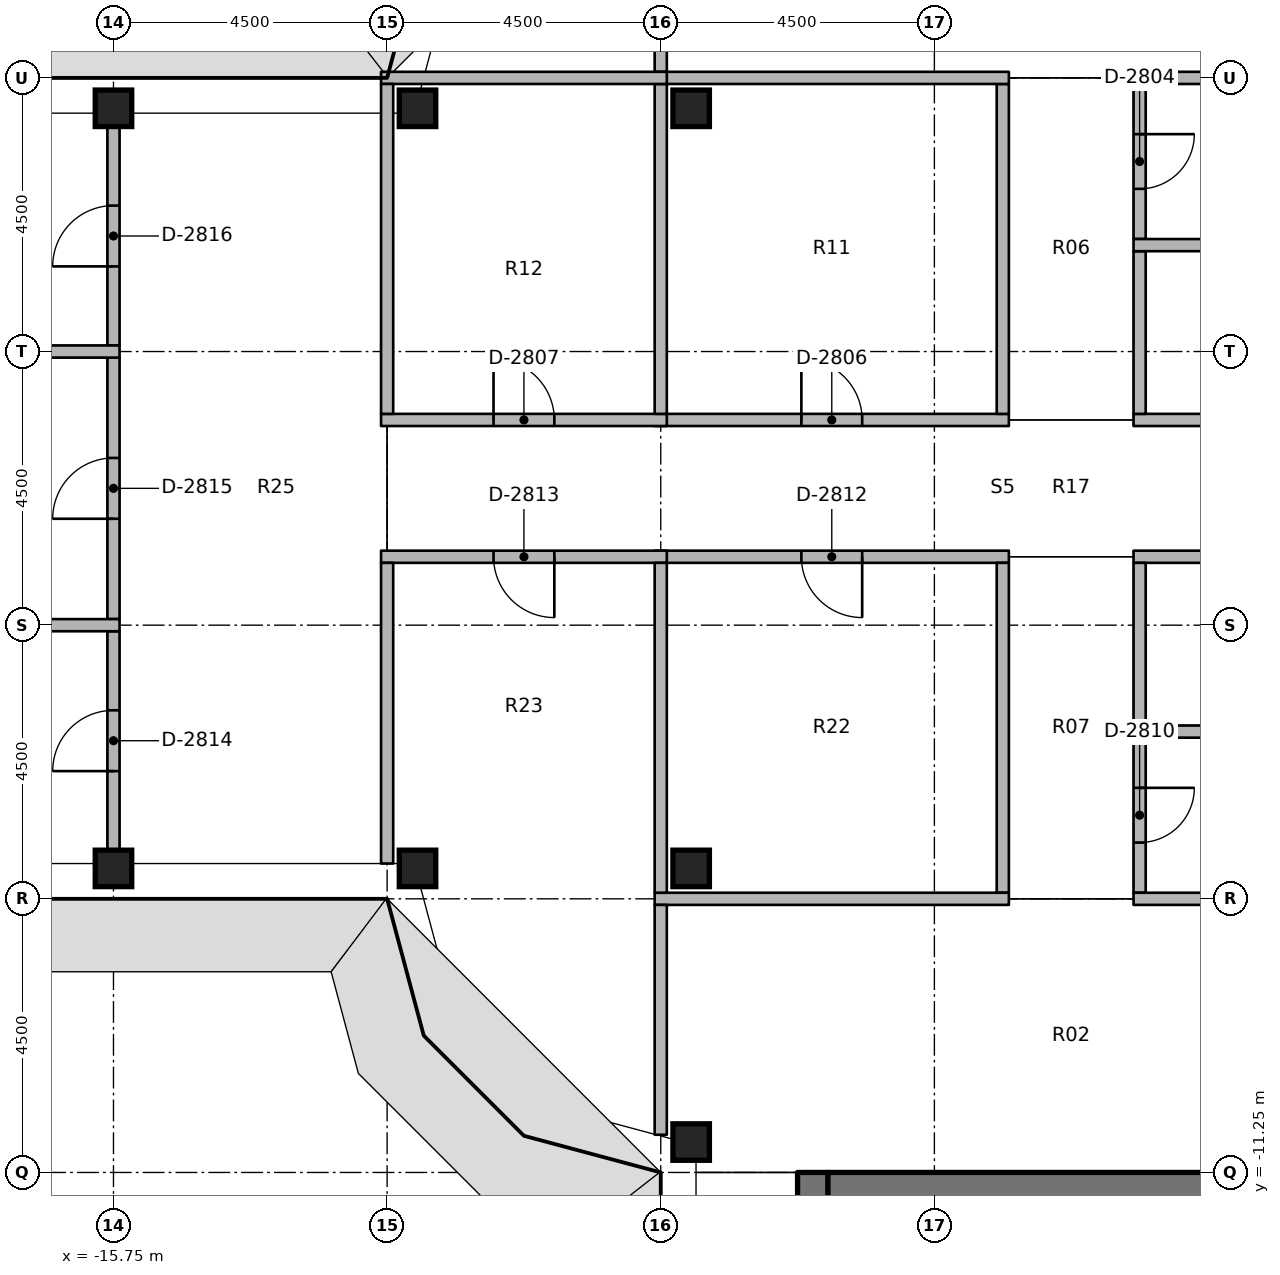
"""IFC4 building model, lengths in metres.
Left out: names, types, materials, properties, quantities, classifications, styles, units other than length and angle.
Written with IfcOpenShell. Run it as: python <this file> out.ifc"""

import sys

from ifc_helpers import new_model, si_unit, direction, frame, frame_2d, origin, origin_2d, place, context, subcontext, project, spatial, rectangle, extrude, element, fill, save


model = new_model("IFC4")
c1 = context("Model", 3, precision=1e-05, world=origin(), true_north=direction((0.0, 1.0)))
c2 = subcontext(c1, "Body", "Model", "MODEL_VIEW")
j1 = project(units=[si_unit("LENGTHUNIT", "METRE"), si_unit("PLANEANGLEUNIT", "RADIAN")], contexts=[c1])
p1 = place(None, origin())
s1 = spatial("IfcSite", under=j1, at=p1, CompositionType="ELEMENT")
p2 = place(p1, origin())
s2 = spatial("IfcBuilding", under=s1, at=p2, CompositionType="ELEMENT")
p3 = place(p2, frame((0.0, 0.0, 265.0)))
s3 = spatial("IfcBuildingStorey", under=s2, at=p3, CompositionType="ELEMENT", Elevation=265.0)
for number, where, z_axis, x_axis in (
    (1, (-15.75, -6.25, 0.0), (0.0, 0.0, 1.0), (1.0, 0.0, 0.0)),
    (2, (-15.75, 6.25, 0.0), (0.0, 0.0, 1.0), (1.0, 0.0, 0.0)),
    (3, (-10.75, -6.25, 0.0), (0.0, 0.0, 1.0), (1.0, 0.0, 0.0)),
    (4, (-10.75, 6.25, 0.0), (0.0, 0.0, 1.0), (1.0, 0.0, 0.0)),
    (5, (-6.25, -10.75, 0.0), (0.0, 0.0, 1.0), (1.0, 0.0, 0.0)),
    (6, (-6.25, -6.25, 0.0), (0.0, 0.0, 1.0), (1.0, 0.0, 0.0)),
    (7, (-6.25, 6.25, 0.0), (0.0, 0.0, 1.0), (1.0, 0.0, 0.0)),
):
    element("IfcColumn", number, at=place(p3, frame(where, z_axis=z_axis, x_axis=x_axis)), inside=s3, PredefinedType="COLUMN", context=c2, shape_type="SweptSolid", body=[
        extrude(rectangle(XDim=0.6, YDim=0.6, at=origin_2d()), origin(), (0.0, 0.0, 1.0), 3.65),
    ])
p4 = place(p3, frame((-4.25, -11.25, 0.0), z_axis=(0.0, 0.0, 1.0), x_axis=(0.0, -1.0, 0.0)))
e8 = element("IfcWall", 8, at=p4, inside=s3, PredefinedType="SHEAR", context=c2, shape_type="SweptSolid", body=[
    extrude(rectangle(XDim=15.0, YDim=0.5, at=frame_2d((7.5, 0.0))), origin(), (0.0, 0.0, 1.0), 3.8),
])
p5 = place(p4, frame((7.15, 0.0, 0.0)))
e9 = element("IfcOpeningElement", 9, at=p5, cuts=e8, PredefinedType="OPENING", context=c2, shape_type="SweptSolid", body=[
    extrude(rectangle(XDim=1.5, YDim=2.3, at=frame_2d((0.75, 1.15))), frame((0.0, 0.26, 0.0), z_axis=(0.0, -1.0, 0.0), x_axis=(1.0, 0.0, 0.0)), (0.0, 0.0, 1.0), 0.52),
])
p6 = place(p4, frame((5.55, 0.0, 0.0)))
e10 = element("IfcOpeningElement", 10, at=p6, cuts=e8, PredefinedType="OPENING", context=c2, shape_type="SweptSolid", body=[
    extrude(rectangle(XDim=1.2, YDim=2.1, at=frame_2d((0.6, 1.05))), frame((0.0, 0.26, 0.0), z_axis=(0.0, -1.0, 0.0), x_axis=(1.0, 0.0, 0.0)), (0.0, 0.0, 1.0), 0.52),
])
p7 = place(p3, frame((-4.0, -11.5, 0.0), z_axis=(0.0, 0.0, 1.0), x_axis=(1.0, 0.0, 0.0)))
e11 = element("IfcWall", 11, at=p7, inside=s3, PredefinedType="SHEAR", context=c2, shape_type="SweptSolid", body=[
    extrude(rectangle(XDim=8.0, YDim=0.5, at=frame_2d((4.0, 0.0))), origin(), (0.0, 0.0, 1.0), 3.8),
])
p8 = place(p3, frame((1.025, 1.125, 0.0), z_axis=(0.0, 0.0, 1.0), x_axis=(1.0, 0.0, 0.0)))
e12 = element("IfcWall", 12, at=p8, inside=s3, PredefinedType="PARTITIONING", context=c2, shape_type="SweptSolid", body=[
    extrude(rectangle(XDim=5.825, YDim=0.2, at=frame_2d((2.913, 0.0))), origin(), (0.0, 0.0, 1.0), 2.75),
])
p9 = place(p8, frame((2.462, 0.0, 0.0)))
e13 = element("IfcOpeningElement", 13, at=p9, cuts=e12, PredefinedType="OPENING", context=c2, shape_type="SweptSolid", body=[
    extrude(rectangle(XDim=0.9, YDim=2.1, at=frame_2d((0.45, 1.05))), frame((0.0, 0.11, 0.0), z_axis=(0.0, -1.0, 0.0), x_axis=(1.0, 0.0, 0.0)), (0.0, 0.0, 1.0), 0.22),
])
p10 = place(p3, frame((-6.85, 1.125, 0.0), z_axis=(0.0, 0.0, 1.0), x_axis=(1.0, 0.0, 0.0)))
e14 = element("IfcWall", 14, at=p10, inside=s3, PredefinedType="PARTITIONING", context=c2, shape_type="SweptSolid", body=[
    extrude(rectangle(XDim=5.825, YDim=0.2, at=frame_2d((2.913, 0.0))), origin(), (0.0, 0.0, 1.0), 2.75),
])
p11 = place(p10, frame((2.413, 0.0, 0.0)))
e15 = element("IfcOpeningElement", 15, at=p11, cuts=e14, PredefinedType="OPENING", context=c2, shape_type="SweptSolid", body=[
    extrude(rectangle(XDim=1.0, YDim=2.1, at=frame_2d((0.5, 1.05))), frame((0.0, 0.11, 0.0), z_axis=(0.0, -1.0, 0.0), x_axis=(1.0, 0.0, 0.0)), (0.0, 0.0, 1.0), 0.22),
])
p12 = place(p3, frame((-11.35, 1.125, 0.0), z_axis=(0.0, 0.0, 1.0), x_axis=(1.0, 0.0, 0.0)))
e16 = element("IfcWall", 16, at=p12, inside=s3, PredefinedType="PARTITIONING", context=c2, shape_type="SweptSolid", body=[
    extrude(rectangle(XDim=4.7, YDim=0.2, at=frame_2d((2.35, 0.0))), origin(), (0.0, 0.0, 1.0), 2.75),
])
p13 = place(p12, frame((1.85, 0.0, 0.0)))
e17 = element("IfcOpeningElement", 17, at=p13, cuts=e16, PredefinedType="OPENING", context=c2, shape_type="SweptSolid", body=[
    extrude(rectangle(XDim=1.0, YDim=2.1, at=frame_2d((0.5, 1.05))), frame((0.0, 0.11, 0.0), z_axis=(0.0, -1.0, 0.0), x_axis=(1.0, 0.0, 0.0)), (0.0, 0.0, 1.0), 0.22),
])
p14 = place(p3, frame((6.85, -1.125, 0.0), z_axis=(0.0, 0.0, 1.0), x_axis=(-1.0, 0.0, 0.0)))
e18 = element("IfcWall", 18, at=p14, inside=s3, PredefinedType="PARTITIONING", context=c2, shape_type="SweptSolid", body=[
    extrude(rectangle(XDim=5.825, YDim=0.2, at=frame_2d((2.913, 0.0))), origin(), (0.0, 0.0, 1.0), 2.75),
])
p15 = place(p14, frame((2.462, 0.0, 0.0)))
e19 = element("IfcOpeningElement", 19, at=p15, cuts=e18, PredefinedType="OPENING", context=c2, shape_type="SweptSolid", body=[
    extrude(rectangle(XDim=0.9, YDim=2.1, at=frame_2d((0.45, 1.05))), frame((0.0, 0.11, 0.0), z_axis=(0.0, -1.0, 0.0), x_axis=(1.0, 0.0, 0.0)), (0.0, 0.0, 1.0), 0.22),
])
p16 = place(p3, frame((-1.025, -1.125, 0.0), z_axis=(0.0, 0.0, 1.0), x_axis=(-1.0, 0.0, 0.0)))
e20 = element("IfcWall", 20, at=p16, inside=s3, PredefinedType="PARTITIONING", context=c2, shape_type="SweptSolid", body=[
    extrude(rectangle(XDim=5.825, YDim=0.2, at=frame_2d((2.913, 0.0))), origin(), (0.0, 0.0, 1.0), 2.75),
])
p17 = place(p16, frame((2.413, 0.0, 0.0)))
e21 = element("IfcOpeningElement", 21, at=p17, cuts=e20, PredefinedType="OPENING", context=c2, shape_type="SweptSolid", body=[
    extrude(rectangle(XDim=1.0, YDim=2.1, at=frame_2d((0.5, 1.05))), frame((0.0, 0.11, 0.0), z_axis=(0.0, -1.0, 0.0), x_axis=(1.0, 0.0, 0.0)), (0.0, 0.0, 1.0), 0.22),
])
p18 = place(p3, frame((-6.65, -1.125, 0.0), z_axis=(0.0, 0.0, 1.0), x_axis=(-1.0, 0.0, 0.0)))
e22 = element("IfcWall", 22, at=p18, inside=s3, PredefinedType="PARTITIONING", context=c2, shape_type="SweptSolid", body=[
    extrude(rectangle(XDim=4.7, YDim=0.2, at=frame_2d((2.35, 0.0))), origin(), (0.0, 0.0, 1.0), 2.75),
])
p19 = place(p18, frame((1.85, 0.0, 0.0)))
e23 = element("IfcOpeningElement", 23, at=p19, cuts=e22, PredefinedType="OPENING", context=c2, shape_type="SweptSolid", body=[
    extrude(rectangle(XDim=1.0, YDim=2.1, at=frame_2d((0.5, 1.05))), frame((0.0, 0.11, 0.0), z_axis=(0.0, -1.0, 0.0), x_axis=(1.0, 0.0, 0.0)), (0.0, 0.0, 1.0), 0.22),
])
p20 = place(p3, frame((1.125, 1.225, 0.0), z_axis=(0.0, 0.0, 1.0), x_axis=(0.0, 1.0, 0.0)))
e24 = element("IfcWall", 24, at=p20, inside=s3, PredefinedType="PARTITIONING", context=c2, shape_type="SweptSolid", body=[
    extrude(rectangle(XDim=2.675, YDim=0.2, at=frame_2d((1.337, 0.0))), origin(), (0.0, 0.0, 1.0), 2.75),
])
p21 = place(p3, frame((1.125, 6.65, 0.0), z_axis=(0.0, 0.0, 1.0), x_axis=(0.0, -1.0, 0.0)))
e25 = element("IfcWall", 25, at=p21, inside=s3, PredefinedType="PARTITIONING", context=c2, shape_type="SweptSolid", body=[
    extrude(rectangle(XDim=2.55, YDim=0.2, at=frame_2d((1.275, 0.0))), origin(), (0.0, 0.0, 1.0), 2.75),
])
p22 = place(p21, frame((0.825, 0.0, 0.0)))
e26 = element("IfcOpeningElement", 26, at=p22, cuts=e25, PredefinedType="OPENING", context=c2, shape_type="SweptSolid", body=[
    extrude(rectangle(XDim=0.9, YDim=2.1, at=frame_2d((0.45, 1.05))), frame((0.0, 0.11, 0.0), z_axis=(0.0, -1.0, 0.0), x_axis=(1.0, 0.0, 0.0)), (0.0, 0.0, 1.0), 0.22),
])
p23 = place(p3, frame((-1.125, 1.225, 0.0), z_axis=(0.0, 0.0, 1.0), x_axis=(0.0, 1.0, 0.0)))
e27 = element("IfcWall", 27, at=p23, inside=s3, PredefinedType="PARTITIONING", context=c2, shape_type="SweptSolid", body=[
    extrude(rectangle(XDim=5.425, YDim=0.2, at=frame_2d((2.712, 0.0))), origin(), (0.0, 0.0, 1.0), 2.75),
])
p24 = place(p3, frame((1.125, -3.9, 0.0), z_axis=(0.0, 0.0, 1.0), x_axis=(0.0, 1.0, 0.0)))
e28 = element("IfcWall", 28, at=p24, inside=s3, PredefinedType="PARTITIONING", context=c2, shape_type="SweptSolid", body=[
    extrude(rectangle(XDim=2.675, YDim=0.2, at=frame_2d((1.337, 0.0))), origin(), (0.0, 0.0, 1.0), 2.75),
])
p25 = place(p3, frame((1.125, -4.1, 0.0), z_axis=(0.0, 0.0, 1.0), x_axis=(0.0, -1.0, 0.0)))
e29 = element("IfcWall", 29, at=p25, inside=s3, PredefinedType="PARTITIONING", context=c2, shape_type="SweptSolid", body=[
    extrude(rectangle(XDim=2.55, YDim=0.2, at=frame_2d((1.275, 0.0))), origin(), (0.0, 0.0, 1.0), 2.75),
])
p26 = place(p25, frame((0.825, 0.0, 0.0)))
e30 = element("IfcOpeningElement", 30, at=p26, cuts=e29, PredefinedType="OPENING", context=c2, shape_type="SweptSolid", body=[
    extrude(rectangle(XDim=0.9, YDim=2.1, at=frame_2d((0.45, 1.05))), frame((0.0, 0.11, 0.0), z_axis=(0.0, -1.0, 0.0), x_axis=(1.0, 0.0, 0.0)), (0.0, 0.0, 1.0), 0.22),
])
p27 = place(p3, frame((-1.125, -6.65, 0.0), z_axis=(0.0, 0.0, 1.0), x_axis=(0.0, 1.0, 0.0)))
e31 = element("IfcWall", 31, at=p27, inside=s3, PredefinedType="PARTITIONING", context=c2, shape_type="SweptSolid", body=[
    extrude(rectangle(XDim=5.425, YDim=0.2, at=frame_2d((2.712, 0.0))), origin(), (0.0, 0.0, 1.0), 2.75),
])
for number, where, z_axis, x_axis in (
    (32, (1.025, 6.75, 0.0), (0.0, 0.0, 1.0), (1.0, 0.0, 0.0)),
    (33, (-6.85, 6.75, 0.0), (0.0, 0.0, 1.0), (1.0, 0.0, 0.0)),
):
    element("IfcWall", number, at=place(p3, frame(where, z_axis=z_axis, x_axis=x_axis)), inside=s3, PredefinedType="PARTITIONING", context=c2, shape_type="SweptSolid", body=[
        extrude(rectangle(XDim=5.825, YDim=0.2, at=frame_2d((2.913, 0.0))), origin(), (0.0, 0.0, 1.0), 2.75),
    ])
p28 = place(p3, frame((-6.75, 6.85, 0.0), z_axis=(0.0, 0.0, 1.0), x_axis=(0.0, 1.0, 0.0)))
e34 = element("IfcWall", 34, at=p28, inside=s3, PredefinedType="PARTITIONING", context=c2, shape_type="SweptSolid", body=[
    extrude(rectangle(XDim=3.78, YDim=0.2, at=frame_2d((1.89, 0.0))), origin(), (0.0, 0.0, 1.0), 2.75),
])
p29 = place(p28, frame((1.44, 0.0, 0.0)))
e35 = element("IfcOpeningElement", 35, at=p29, cuts=e34, PredefinedType="OPENING", context=c2, shape_type="SweptSolid", body=[
    extrude(rectangle(XDim=0.9, YDim=2.1, at=frame_2d((0.45, 1.05))), frame((0.0, 0.11, 0.0), z_axis=(0.0, -1.0, 0.0), x_axis=(1.0, 0.0, 0.0)), (0.0, 0.0, 1.0), 0.22),
])
for number, where, z_axis, x_axis in (
    (36, (1.025, -6.75, 0.0), (0.0, 0.0, 1.0), (1.0, 0.0, 0.0)),
    (37, (-6.85, -6.75, 0.0), (0.0, 0.0, 1.0), (1.0, 0.0, 0.0)),
):
    element("IfcWall", number, at=place(p3, frame(where, z_axis=z_axis, x_axis=x_axis)), inside=s3, PredefinedType="PARTITIONING", context=c2, shape_type="SweptSolid", body=[
        extrude(rectangle(XDim=5.825, YDim=0.2, at=frame_2d((2.913, 0.0))), origin(), (0.0, 0.0, 1.0), 2.75),
    ])
p30 = place(p3, frame((-6.75, -10.63, 0.0), z_axis=(0.0, 0.0, 1.0), x_axis=(0.0, 1.0, 0.0)))
e38 = element("IfcWall", 38, at=p30, inside=s3, PredefinedType="PARTITIONING", context=c2, shape_type="SweptSolid", body=[
    extrude(rectangle(XDim=3.78, YDim=0.2, at=frame_2d((1.89, 0.0))), origin(), (0.0, 0.0, 1.0), 2.75),
])
p31 = place(p3, frame((1.025, 4.0, 0.0), z_axis=(0.0, 0.0, 1.0), x_axis=(1.0, 0.0, 0.0)))
e39 = element("IfcWall", 39, at=p31, inside=s3, PredefinedType="PARTITIONING", context=c2, shape_type="SweptSolid", body=[
    extrude(rectangle(XDim=5.825, YDim=0.2, at=frame_2d((2.913, 0.0))), origin(), (0.0, 0.0, 1.0), 2.75),
])
p32 = place(p3, frame((-6.75, 1.225, 0.0), z_axis=(0.0, 0.0, 1.0), x_axis=(0.0, 1.0, 0.0)))
e40 = element("IfcWall", 40, at=p32, inside=s3, PredefinedType="PARTITIONING", context=c2, shape_type="SweptSolid", body=[
    extrude(rectangle(XDim=5.425, YDim=0.2, at=frame_2d((2.712, 0.0))), origin(), (0.0, 0.0, 1.0), 2.75),
])
p33 = place(p3, frame((-11.35, 6.75, 0.0), z_axis=(0.0, 0.0, 1.0), x_axis=(1.0, 0.0, 0.0)))
e41 = element("IfcWall", 41, at=p33, inside=s3, PredefinedType="PARTITIONING", context=c2, shape_type="SweptSolid", body=[
    extrude(rectangle(XDim=4.7, YDim=0.2, at=frame_2d((2.35, 0.0))), origin(), (0.0, 0.0, 1.0), 2.75),
])
p34 = place(p3, frame((-11.25, 1.225, 0.0), z_axis=(0.0, 0.0, 1.0), x_axis=(0.0, 1.0, 0.0)))
e42 = element("IfcWall", 42, at=p34, inside=s3, PredefinedType="PARTITIONING", context=c2, shape_type="SweptSolid", body=[
    extrude(rectangle(XDim=5.425, YDim=0.2, at=frame_2d((2.712, 0.0))), origin(), (0.0, 0.0, 1.0), 2.75),
])
p35 = place(p3, frame((1.025, -4.0, 0.0), z_axis=(0.0, 0.0, 1.0), x_axis=(1.0, 0.0, 0.0)))
e43 = element("IfcWall", 43, at=p35, inside=s3, PredefinedType="PARTITIONING", context=c2, shape_type="SweptSolid", body=[
    extrude(rectangle(XDim=5.825, YDim=0.2, at=frame_2d((2.913, 0.0))), origin(), (0.0, 0.0, 1.0), 2.75),
])
p36 = place(p3, frame((-6.75, -6.65, 0.0), z_axis=(0.0, 0.0, 1.0), x_axis=(0.0, 1.0, 0.0)))
e44 = element("IfcWall", 44, at=p36, inside=s3, PredefinedType="PARTITIONING", context=c2, shape_type="SweptSolid", body=[
    extrude(rectangle(XDim=5.425, YDim=0.2, at=frame_2d((2.712, 0.0))), origin(), (0.0, 0.0, 1.0), 2.75),
])
p37 = place(p3, frame((-11.25, -6.17, 0.0), z_axis=(0.0, 0.0, 1.0), x_axis=(0.0, 1.0, 0.0)))
e45 = element("IfcWall", 45, at=p37, inside=s3, PredefinedType="PARTITIONING", context=c2, shape_type="SweptSolid", body=[
    extrude(rectangle(XDim=4.945, YDim=0.2, at=frame_2d((2.472, 0.0))), origin(), (0.0, 0.0, 1.0), 2.75),
])
p38 = place(p3, frame((-15.75, -5.95, 0.0), z_axis=(0.0, 0.0, 1.0), x_axis=(0.0, 1.0, 0.0)))
e46 = element("IfcWall", 46, at=p38, inside=s3, PredefinedType="PARTITIONING", context=c2, shape_type="SweptSolid", body=[
    extrude(rectangle(XDim=3.6, YDim=0.2, at=frame_2d((1.8, 0.0))), origin(), (0.0, 0.0, 1.0), 2.75),
])
p39 = place(p38, frame((1.3, 0.0, 0.0)))
e47 = element("IfcOpeningElement", 47, at=p39, cuts=e46, PredefinedType="OPENING", context=c2, shape_type="SweptSolid", body=[
    extrude(rectangle(XDim=1.0, YDim=2.1, at=frame_2d((0.5, 1.05))), frame((0.0, 0.11, 0.0), z_axis=(0.0, -1.0, 0.0), x_axis=(1.0, 0.0, 0.0)), (0.0, 0.0, 1.0), 0.22),
])
p40 = place(p3, frame((-15.75, -2.15, 0.0), z_axis=(0.0, 0.0, 1.0), x_axis=(0.0, 1.0, 0.0)))
e48 = element("IfcWall", 48, at=p40, inside=s3, PredefinedType="PARTITIONING", context=c2, shape_type="SweptSolid", body=[
    extrude(rectangle(XDim=4.3, YDim=0.2, at=frame_2d((2.15, 0.0))), origin(), (0.0, 0.0, 1.0), 2.75),
])
p41 = place(p40, frame((1.65, 0.0, 0.0)))
e49 = element("IfcOpeningElement", 49, at=p41, cuts=e48, PredefinedType="OPENING", context=c2, shape_type="SweptSolid", body=[
    extrude(rectangle(XDim=1.0, YDim=2.1, at=frame_2d((0.5, 1.05))), frame((0.0, 0.11, 0.0), z_axis=(0.0, -1.0, 0.0), x_axis=(1.0, 0.0, 0.0)), (0.0, 0.0, 1.0), 0.22),
])
p42 = place(p3, frame((-15.75, 2.35, 0.0), z_axis=(0.0, 0.0, 1.0), x_axis=(0.0, 1.0, 0.0)))
e50 = element("IfcWall", 50, at=p42, inside=s3, PredefinedType="PARTITIONING", context=c2, shape_type="SweptSolid", body=[
    extrude(rectangle(XDim=3.6, YDim=0.2, at=frame_2d((1.8, 0.0))), origin(), (0.0, 0.0, 1.0), 2.75),
])
p43 = place(p42, frame((1.3, 0.0, 0.0)))
e51 = element("IfcOpeningElement", 51, at=p43, cuts=e50, PredefinedType="OPENING", context=c2, shape_type="SweptSolid", body=[
    extrude(rectangle(XDim=1.0, YDim=2.1, at=frame_2d((0.5, 1.05))), frame((0.0, 0.11, 0.0), z_axis=(0.0, -1.0, 0.0), x_axis=(1.0, 0.0, 0.0)), (0.0, 0.0, 1.0), 0.22),
])
for number, where, z_axis, x_axis in (
    (52, (-30.88, -2.25, 0.0), (0.0, 0.0, 1.0), (1.0, 0.0, 0.0)),
    (53, (-30.88, 2.25, 0.0), (0.0, 0.0, 1.0), (1.0, 0.0, 0.0)),
):
    element("IfcWall", number, at=place(p3, frame(where, z_axis=z_axis, x_axis=x_axis)), inside=s3, PredefinedType="PARTITIONING", context=c2, shape_type="SweptSolid", body=[
        extrude(rectangle(XDim=15.23, YDim=0.2, at=frame_2d((7.615, 0.0))), origin(), (0.0, 0.0, 1.0), 2.75),
    ])
p44 = place(p22, origin())
e54 = element("IfcDoor", 54, at=p44, inside=s3, OperationType="SINGLE_SWING_RIGHT", PredefinedType="DOOR", context=c2, shape_type="SweptSolid", body=[
    extrude(rectangle(XDim=0.9, YDim=2.1, at=frame_2d((0.45, 1.05))), frame((0.0, 0.025, 0.0), z_axis=(0.0, -1.0, 0.0), x_axis=(1.0, 0.0, 0.0)), (0.0, 0.0, 1.0), 0.05),
])
fill(e26, e54)
p45 = place(p11, origin())
e55 = element("IfcDoor", 55, at=p45, inside=s3, OperationType="SINGLE_SWING_RIGHT", PredefinedType="DOOR", context=c2, shape_type="SweptSolid", body=[
    extrude(rectangle(XDim=1.0, YDim=2.1, at=frame_2d((0.5, 1.05))), frame((0.0, 0.025, 0.0), z_axis=(0.0, -1.0, 0.0), x_axis=(1.0, 0.0, 0.0)), (0.0, 0.0, 1.0), 0.05),
])
fill(e15, e55)
p46 = place(p13, origin())
e56 = element("IfcDoor", 56, at=p46, inside=s3, OperationType="SINGLE_SWING_RIGHT", PredefinedType="DOOR", context=c2, shape_type="SweptSolid", body=[
    extrude(rectangle(XDim=1.0, YDim=2.1, at=frame_2d((0.5, 1.05))), frame((0.0, 0.025, 0.0), z_axis=(0.0, -1.0, 0.0), x_axis=(1.0, 0.0, 0.0)), (0.0, 0.0, 1.0), 0.05),
])
fill(e17, e56)
p47 = place(p26, origin())
e57 = element("IfcDoor", 57, at=p47, inside=s3, OperationType="SINGLE_SWING_RIGHT", PredefinedType="DOOR", context=c2, shape_type="SweptSolid", body=[
    extrude(rectangle(XDim=0.9, YDim=2.1, at=frame_2d((0.45, 1.05))), frame((0.0, 0.025, 0.0), z_axis=(0.0, -1.0, 0.0), x_axis=(1.0, 0.0, 0.0)), (0.0, 0.0, 1.0), 0.05),
])
fill(e30, e57)
p48 = place(p17, origin())
e58 = element("IfcDoor", 58, at=p48, inside=s3, OperationType="SINGLE_SWING_RIGHT", PredefinedType="DOOR", context=c2, shape_type="SweptSolid", body=[
    extrude(rectangle(XDim=1.0, YDim=2.1, at=frame_2d((0.5, 1.05))), frame((0.0, 0.025, 0.0), z_axis=(0.0, -1.0, 0.0), x_axis=(1.0, 0.0, 0.0)), (0.0, 0.0, 1.0), 0.05),
])
fill(e21, e58)
p49 = place(p19, origin())
e59 = element("IfcDoor", 59, at=p49, inside=s3, OperationType="SINGLE_SWING_RIGHT", PredefinedType="DOOR", context=c2, shape_type="SweptSolid", body=[
    extrude(rectangle(XDim=1.0, YDim=2.1, at=frame_2d((0.5, 1.05))), frame((0.0, 0.025, 0.0), z_axis=(0.0, -1.0, 0.0), x_axis=(1.0, 0.0, 0.0)), (0.0, 0.0, 1.0), 0.05),
])
fill(e23, e59)
p50 = place(p39, origin())
e60 = element("IfcDoor", 60, at=p50, inside=s3, OperationType="SINGLE_SWING_LEFT", PredefinedType="DOOR", context=c2, shape_type="SweptSolid", body=[
    extrude(rectangle(XDim=1.0, YDim=2.1, at=frame_2d((0.5, 1.05))), frame((0.0, 0.025, 0.0), z_axis=(0.0, -1.0, 0.0), x_axis=(1.0, 0.0, 0.0)), (0.0, 0.0, 1.0), 0.05),
])
fill(e47, e60)
p51 = place(p41, origin())
e61 = element("IfcDoor", 61, at=p51, inside=s3, OperationType="SINGLE_SWING_RIGHT", PredefinedType="DOOR", context=c2, shape_type="SweptSolid", body=[
    extrude(rectangle(XDim=1.0, YDim=2.1, at=frame_2d((0.5, 1.05))), frame((0.0, 0.025, 0.0), z_axis=(0.0, -1.0, 0.0), x_axis=(1.0, 0.0, 0.0)), (0.0, 0.0, 1.0), 0.05),
])
fill(e49, e61)
p52 = place(p43, origin())
e62 = element("IfcDoor", 62, at=p52, inside=s3, OperationType="SINGLE_SWING_RIGHT", PredefinedType="DOOR", context=c2, shape_type="SweptSolid", body=[
    extrude(rectangle(XDim=1.0, YDim=2.1, at=frame_2d((0.5, 1.05))), frame((0.0, 0.025, 0.0), z_axis=(0.0, -1.0, 0.0), x_axis=(1.0, 0.0, 0.0)), (0.0, 0.0, 1.0), 0.05),
])
fill(e51, e62)
save(model, sys.argv[1])
